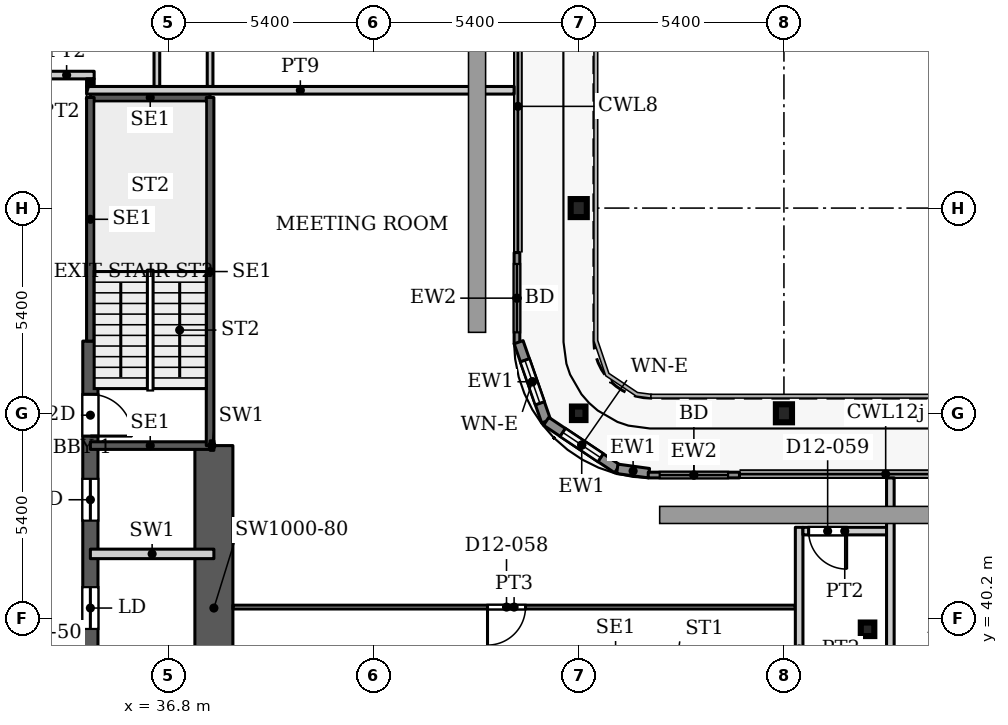
"""IFC4 building model, lengths in metres.
Left out: names, types, materials, properties, quantities, classifications, styles, units other than length and angle.
Written with IfcOpenShell. Run it as: python <this file> out.ifc"""

import sys

from ifc_helpers import new_model, si_unit, direction, frame, frame_2d, origin, origin_2d, place, context, subcontext, project, spatial, rectangle, hollow_rectangle, i_section, extrude, source, transform, mapped, element, fill, save


model = new_model("IFC4")
c1 = context("Model", 3, precision=1e-05, world=origin(), true_north=direction((0.0, 1.0)))
c2 = subcontext(c1, "Body", "Model", "MODEL_VIEW")
j1 = project(units=[si_unit("LENGTHUNIT", "METRE"), si_unit("PLANEANGLEUNIT", "RADIAN")], contexts=[c1])
p1 = place(None, origin())
s1 = spatial("IfcSite", under=j1, at=p1, CompositionType="ELEMENT")
p2 = place(p1, origin())
s2 = spatial("IfcBuilding", under=s1, at=p2, CompositionType="ELEMENT")
p3 = place(p2, frame((0.0, 0.0, 53.9)))
s3 = spatial("IfcBuildingStorey", under=s2, at=p3, CompositionType="ELEMENT", Elevation=53.9)
for number, where, z_axis, x_axis in (
    (1, (53.0, 45.6, 0.0), (0.0, 0.0, 1.0), (1.0, 0.0, 0.0)),
    (2, (47.6, 51.0, 0.0), (0.0, 0.0, 1.0), (1.0, 0.0, 0.0)),
):
    element("IfcColumn", number, at=place(p3, frame(where, z_axis=z_axis, x_axis=x_axis)), inside=s3, PredefinedType="COLUMN", context=c2, shape_type="SweptSolid", body=[
        extrude(i_section(OverallWidth=0.424, OverallDepth=0.474, WebThickness=0.048, FlangeThickness=0.077, FilletRadius=0.014, at=origin_2d()), origin(), (0.0, 0.0, 1.0), 3.9),
    ])
for number, where, z_axis, x_axis in (
    (3, (55.2, 39.916, 0.0), (0.0, 0.0, 1.0), (1.0, 0.0, 0.0)),
    (4, (47.6, 45.6, 0.0), (0.0, 0.0, 1.0), (1.0, 0.0, 0.0)),
):
    element("IfcColumn", number, at=place(p3, frame(where, z_axis=z_axis, x_axis=x_axis)), inside=s3, PredefinedType="COLUMN", context=c2, shape_type="SweptSolid", body=[
        extrude(hollow_rectangle(XDim=0.356, YDim=0.356, WallThickness=0.016, InnerFilletRadius=0.016, OuterFilletRadius=0.032, at=origin_2d()), origin(), (0.0, 0.0, 1.0), 3.9),
    ])
p4 = place(p3, frame((34.75, 29.05, 0.0), z_axis=(0.0, 0.0, 1.0), x_axis=(0.0, 1.0, 0.0)))
e5 = element("IfcWall", 5, at=p4, inside=s3, PredefinedType="SHEAR", context=c2, shape_type="SweptSolid", body=[
    extrude(rectangle(XDim=18.45, YDim=0.4, at=frame_2d((9.225, 0.0))), origin(), (0.0, 0.0, 1.0), 3.9),
])
p5 = place(p4, frame((8.025, 0.0, 0.0)))
e6 = element("IfcOpeningElement", 6, at=p5, cuts=e5, PredefinedType="OPENING", context=c2, shape_type="SweptSolid", body=[
    extrude(rectangle(XDim=1.1, YDim=2.2, at=frame_2d((0.55, 1.1))), frame((0.0, 0.21, 0.0), z_axis=(0.0, -1.0, 0.0), x_axis=(1.0, 0.0, 0.0)), (0.0, 0.0, 1.0), 0.42),
])
p6 = place(p4, frame((10.875, 0.0, 0.0)))
e7 = element("IfcOpeningElement", 7, at=p6, cuts=e5, PredefinedType="OPENING", context=c2, shape_type="SweptSolid", body=[
    extrude(rectangle(XDim=1.1, YDim=2.2, at=frame_2d((0.55, 1.1))), frame((0.0, 0.21, 0.0), z_axis=(0.0, -1.0, 0.0), x_axis=(1.0, 0.0, 0.0)), (0.0, 0.0, 1.0), 0.42),
])
p7 = place(p4, frame((13.725, 0.0, 0.0)))
e8 = element("IfcOpeningElement", 8, at=p7, cuts=e5, PredefinedType="OPENING", context=c2, shape_type="SweptSolid", body=[
    extrude(rectangle(XDim=1.1, YDim=2.2, at=frame_2d((0.55, 1.1))), frame((0.0, 0.21, 0.0), z_axis=(0.0, -1.0, 0.0), x_axis=(1.0, 0.0, 0.0)), (0.0, 0.0, 1.0), 0.42),
])
p8 = place(p4, frame((15.95, 0.0, 0.0)))
e9 = element("IfcOpeningElement", 9, at=p8, cuts=e5, PredefinedType="OPENING", context=c2, shape_type="SweptSolid", body=[
    extrude(rectangle(XDim=1.1, YDim=2.2, at=frame_2d((0.55, 1.1))), frame((0.0, 0.21, 0.0), z_axis=(0.0, -1.0, 0.0), x_axis=(1.0, 0.0, 0.0)), (0.0, 0.0, 1.0), 0.42),
])
p9 = place(p3, frame((38.0, 36.2, 0.0), z_axis=(0.0, 0.0, 1.0), x_axis=(0.0, 1.0, 0.0)))
e10 = element("IfcWall", 10, at=p9, inside=s3, PredefinedType="SHEAR", context=c2, shape_type="SweptSolid", body=[
    extrude(rectangle(XDim=8.55, YDim=1.0, at=frame_2d((4.275, 0.0))), origin(), (0.0, 0.0, 1.0), 3.9),
])
p10 = place(p3, frame((45.975, 49.83, 0.0), z_axis=(0.0, 0.0, 1.0), x_axis=(0.0, -1.0, 0.0)))
e11 = element("IfcWall", 11, at=p10, inside=s3, PredefinedType="SOLIDWALL", context=c2, shape_type="SweptSolid", body=[
    extrude(rectangle(XDim=2.4, YDim=0.15, at=frame_2d((1.2, 0.0))), origin(), (0.0, 0.0, 1.0), 3.75),
])
p11 = place(p10, frame((0.3, 0.0, 0.0)))
e12 = element("IfcOpeningElement", 12, at=p11, cuts=e11, PredefinedType="OPENING", context=c2, shape_type="SweptSolid", body=[
    extrude(rectangle(XDim=1.8, YDim=2.4, at=frame_2d((0.9, 1.2))), frame((0.0, 0.085, 0.0), z_axis=(0.0, -1.0, 0.0), x_axis=(1.0, 0.0, 0.0)), (0.0, 0.0, 1.0), 0.17),
])
p12 = place(p3, frame((46.018, 47.471, 0.0), z_axis=(0.0, 0.0, 1.0), x_axis=(0.328791208903, -0.944402637093, 0.0)))
e13 = element("IfcWall", 13, at=p12, inside=s3, PredefinedType="SOLIDWALL", context=c2, shape_type="SweptSolid", body=[
    extrude(rectangle(XDim=2.205, YDim=0.25, at=frame_2d((1.102, 0.0))), origin(), (0.0, 0.0, 1.0), 3.75),
])
p13 = place(p12, frame((0.503, 0.0, 0.6)))
e14 = element("IfcOpeningElement", 14, at=p13, cuts=e13, PredefinedType="OPENING", context=c2, shape_type="SweptSolid", body=[
    extrude(rectangle(XDim=1.2, YDim=2.1, at=frame_2d((0.6, 1.05))), frame((0.0, 0.135, 0.0), z_axis=(0.0, -1.0, 0.0), x_axis=(1.0, 0.0, 0.0)), (0.0, 0.0, 1.0), 0.27),
])
p14 = place(p3, frame((46.743, 45.389, 0.0), z_axis=(0.0, 0.0, 1.0), x_axis=(0.831449265529, -0.555600682912, 0.0)))
e15 = element("IfcWall", 15, at=p14, inside=s3, PredefinedType="SOLIDWALL", context=c2, shape_type="SweptSolid", body=[
    extrude(rectangle(XDim=2.251, YDim=0.25, at=frame_2d((1.126, 0.0))), origin(), (0.0, 0.0, 1.0), 3.75),
])
p15 = place(p14, frame((0.525, 0.0, 0.6)))
e16 = element("IfcOpeningElement", 16, at=p15, cuts=e15, PredefinedType="OPENING", context=c2, shape_type="SweptSolid", body=[
    extrude(rectangle(XDim=1.2, YDim=2.1, at=frame_2d((0.6, 1.05))), frame((0.0, 0.135, 0.0), z_axis=(0.0, -1.0, 0.0), x_axis=(1.0, 0.0, 0.0)), (0.0, 0.0, 1.0), 0.27),
])
p16 = place(p3, frame((48.615, 44.138, 0.0), z_axis=(0.0, 0.0, 1.0), x_axis=(0.990741504246, -0.135761819977, 0.0)))
e17 = element("IfcWall", 17, at=p16, inside=s3, PredefinedType="SOLIDWALL", context=c2, shape_type="SweptSolid", body=[
    extrude(rectangle(XDim=0.84, YDim=0.25, at=frame_2d((0.42, 0.0))), origin(), (0.0, 0.0, 1.0), 3.75),
])
p17 = place(p3, frame((49.43, 43.975, 0.0), z_axis=(0.0, 0.0, 1.0), x_axis=(1.0, 0.0, 0.0)))
e18 = element("IfcWall", 18, at=p17, inside=s3, PredefinedType="SOLIDWALL", context=c2, shape_type="SweptSolid", body=[
    extrude(rectangle(XDim=2.4, YDim=0.15, at=frame_2d((1.2, 0.0))), origin(), (0.0, 0.0, 1.0), 3.75),
])
p18 = place(p17, frame((0.3, 0.0, 0.0)))
e19 = element("IfcOpeningElement", 19, at=p18, cuts=e18, PredefinedType="OPENING", context=c2, shape_type="SweptSolid", body=[
    extrude(rectangle(XDim=1.8, YDim=2.4, at=frame_2d((0.9, 1.2))), frame((0.0, 0.085, 0.0), z_axis=(0.0, -1.0, 0.0), x_axis=(1.0, 0.0, 0.0)), (0.0, 0.0, 1.0), 0.17),
])
for number, where, z_axis, x_axis in (
    (20, (34.75, 44.75, 0.0), (0.0, 0.0, 1.0), (1.0, 0.0, 0.0)),
    (21, (34.75, 53.91, 0.0), (0.0, 0.0, 1.0), (1.0, 0.0, 0.0)),
):
    element("IfcWall", number, at=place(p3, frame(where, z_axis=z_axis, x_axis=x_axis)), inside=s3, PredefinedType="SHEAR", context=c2, shape_type="SweptSolid", body=[
        extrude(rectangle(XDim=3.15, YDim=0.2, at=frame_2d((1.575, 0.0))), origin(), (0.0, 0.0, 1.0), 3.9),
    ])
p19 = place(p3, frame((34.75, 47.5, 0.0), z_axis=(0.0, 0.0, 1.0), x_axis=(0.0, 1.0, 0.0)))
e22 = element("IfcWall", 22, at=p19, inside=s3, PredefinedType="SHEAR", context=c2, shape_type="SweptSolid", body=[
    extrude(rectangle(XDim=6.41, YDim=0.2, at=frame_2d((3.205, 0.0))), origin(), (0.0, 0.0, 1.0), 3.9),
])
p20 = place(p3, frame((37.9, 44.75, 0.0), z_axis=(0.0, 0.0, 1.0), x_axis=(0.0, 1.0, 0.0)))
e23 = element("IfcWall", 23, at=p20, inside=s3, PredefinedType="SHEAR", context=c2, shape_type="SweptSolid", body=[
    extrude(rectangle(XDim=9.16, YDim=0.2, at=frame_2d((4.58, 0.0))), origin(), (0.0, 0.0, 1.0), 3.9),
])
p21 = place(p3, frame((34.75, 41.9, 0.0), z_axis=(0.0, 0.0, 1.0), x_axis=(1.0, 0.0, 0.0)))
e24 = element("IfcWall", 24, at=p21, inside=s3, PredefinedType="PARTITIONING", context=c2, shape_type="SweptSolid", body=[
    extrude(rectangle(XDim=3.25, YDim=0.25, at=frame_2d((1.625, 0.0))), origin(), (0.0, 0.0, 1.0), 3.9),
])
p22 = place(p3, frame((37.9, 44.75, 0.0), z_axis=(0.0, 0.0, 1.0), x_axis=(1.0, 0.0, 0.0)))
e25 = element("IfcWall", 25, at=p22, inside=s3, PredefinedType="PARTITIONING", context=c2, shape_type="SweptSolid", body=[
    extrude(rectangle(XDim=0.1, YDim=0.25, at=frame_2d((0.05, 0.0))), origin(), (0.0, 0.0, 1.0), 3.9),
])
p23 = place(p3, frame((33.4, 54.5, 0.0), z_axis=(0.0, 0.0, 1.0), x_axis=(1.0, 0.0, 0.0)))
e26 = element("IfcWall", 26, at=p23, inside=s3, PredefinedType="PARTITIONING", context=c2, shape_type="SweptSolid", body=[
    extrude(rectangle(XDim=1.45, YDim=0.2, at=frame_2d((0.725, 0.0))), origin(), (0.0, 0.0, 1.0), 3.6),
])
p24 = place(p3, frame((34.65, 54.1, 0.0), z_axis=(0.0, 0.0, 1.0), x_axis=(1.0, 0.0, 0.0)))
e27 = element("IfcWall", 27, at=p24, inside=s3, PredefinedType="PARTITIONING", context=c2, shape_type="SweptSolid", body=[
    extrude(rectangle(XDim=11.25, YDim=0.2, at=frame_2d((5.625, 0.0))), origin(), (0.0, 0.0, 1.0), 3.6),
])
p25 = place(p3, frame((34.75, 54.2, 0.0), z_axis=(0.0, 0.0, 1.0), x_axis=(0.0, 1.0, 0.0)))
e28 = element("IfcWall", 28, at=p25, inside=s3, PredefinedType="PARTITIONING", context=c2, shape_type="SweptSolid", body=[
    extrude(rectangle(XDim=0.2, YDim=0.2, at=frame_2d((0.1, 0.0))), origin(), (0.0, 0.0, 1.0), 3.6),
])
p26 = place(p3, frame((36.5, 54.2, 0.0), z_axis=(0.0, 0.0, 1.0), x_axis=(0.0, 1.0, 0.0)))
e29 = element("IfcWall", 29, at=p26, inside=s3, PredefinedType="PARTITIONING", context=c2, shape_type="SweptSolid", body=[
    extrude(rectangle(XDim=10.175, YDim=0.15, at=frame_2d((5.087, 0.0))), origin(), (0.0, 0.0, 1.0), 3.6),
])
p27 = place(p26, frame((5.8, 0.0, 0.0)))
e30 = element("IfcOpeningElement", 30, at=p27, cuts=e29, PredefinedType="OPENING", context=c2, shape_type="SweptSolid", body=[
    extrude(rectangle(XDim=0.8, YDim=2.1, at=frame_2d((0.4, 1.05))), frame((0.0, 0.085, 0.0), z_axis=(0.0, -1.0, 0.0), x_axis=(1.0, 0.0, 0.0)), (0.0, 0.0, 1.0), 0.17),
])
p28 = place(p26, frame((1.45, 0.0, 0.0)))
e31 = element("IfcOpeningElement", 31, at=p28, cuts=e29, PredefinedType="OPENING", context=c2, shape_type="SweptSolid", body=[
    extrude(rectangle(XDim=0.9, YDim=2.1, at=frame_2d((0.45, 1.05))), frame((0.0, 0.085, 0.0), z_axis=(0.0, -1.0, 0.0), x_axis=(1.0, 0.0, 0.0)), (0.0, 0.0, 1.0), 0.17),
])
p29 = place(p26, frame((8.5, 0.0, 0.0)))
e32 = element("IfcOpeningElement", 32, at=p29, cuts=e29, PredefinedType="OPENING", context=c2, shape_type="SweptSolid", body=[
    extrude(rectangle(XDim=0.8, YDim=2.1, at=frame_2d((0.4, 1.05))), frame((0.0, 0.085, 0.0), z_axis=(0.0, -1.0, 0.0), x_axis=(1.0, 0.0, 0.0)), (0.0, 0.0, 1.0), 0.17),
])
p30 = place(p3, frame((37.9, 54.2, 0.0), z_axis=(0.0, 0.0, 1.0), x_axis=(0.0, 1.0, 0.0)))
e33 = element("IfcWall", 33, at=p30, inside=s3, PredefinedType="PARTITIONING", context=c2, shape_type="SweptSolid", body=[
    extrude(rectangle(XDim=13.3, YDim=0.15, at=frame_2d((6.65, 0.0))), origin(), (0.0, 0.0, 1.0), 3.6),
])
p31 = place(p30, frame((1.25, 0.0, 0.0)))
e34 = element("IfcOpeningElement", 34, at=p31, cuts=e33, PredefinedType="OPENING", context=c2, shape_type="SweptSolid", body=[
    extrude(rectangle(XDim=0.9, YDim=2.1, at=frame_2d((0.45, 1.05))), frame((0.0, 0.085, 0.0), z_axis=(0.0, -1.0, 0.0), x_axis=(1.0, 0.0, 0.0)), (0.0, 0.0, 1.0), 0.17),
])
p32 = place(p30, frame((10.2, 0.0, 0.0)))
e35 = element("IfcOpeningElement", 35, at=p32, cuts=e33, PredefinedType="OPENING", context=c2, shape_type="SweptSolid", body=[
    extrude(rectangle(XDim=1.0, YDim=2.1, at=frame_2d((0.5, 1.05))), frame((0.0, 0.085, 0.0), z_axis=(0.0, -1.0, 0.0), x_axis=(1.0, 0.0, 0.0)), (0.0, 0.0, 1.0), 0.17),
])
p33 = place(p30, frame((4.25, 0.0, 0.0)))
e36 = element("IfcOpeningElement", 36, at=p33, cuts=e33, PredefinedType="OPENING", context=c2, shape_type="SweptSolid", body=[
    extrude(rectangle(XDim=0.9, YDim=2.1, at=frame_2d((0.45, 1.05))), frame((0.0, 0.085, 0.0), z_axis=(0.0, -1.0, 0.0), x_axis=(1.0, 0.0, 0.0)), (0.0, 0.0, 1.0), 0.17),
])
p34 = place(p3, frame((38.499, 40.5, 0.0), z_axis=(0.0, 0.0, 1.0), x_axis=(1.0, 0.0, 0.0)))
e37 = element("IfcWall", 37, at=p34, inside=s3, PredefinedType="PARTITIONING", context=c2, shape_type="SweptSolid", body=[
    extrude(rectangle(XDim=14.801, YDim=0.1, at=frame_2d((7.4, 0.0))), origin(), (0.0, 0.0, 1.0), 3.6),
])
p35 = place(p34, frame((6.701, 0.0, 0.0)))
e38 = element("IfcOpeningElement", 38, at=p35, cuts=e37, PredefinedType="OPENING", context=c2, shape_type="SweptSolid", body=[
    extrude(rectangle(XDim=1.0, YDim=2.1, at=frame_2d((0.5, 1.05))), frame((0.0, 0.06, 0.0), z_axis=(0.0, -1.0, 0.0), x_axis=(1.0, 0.0, 0.0)), (0.0, 0.0, 1.0), 0.12),
])
p36 = place(p3, frame((53.4, 36.199, 0.0), z_axis=(0.0, 0.0, 1.0), x_axis=(0.0, 1.0, 0.0)))
e39 = element("IfcWall", 39, at=p36, inside=s3, PredefinedType="PARTITIONING", context=c2, shape_type="SweptSolid", body=[
    extrude(rectangle(XDim=6.401, YDim=0.2, at=frame_2d((3.201, 0.0))), origin(), (0.0, 0.0, 1.0), 3.6),
])
p37 = place(p3, frame((53.5, 42.5, 0.0), z_axis=(0.0, 0.0, 1.0), x_axis=(1.0, 0.0, 0.0)))
e40 = element("IfcWall", 40, at=p37, inside=s3, PredefinedType="PARTITIONING", context=c2, shape_type="SweptSolid", body=[
    extrude(rectangle(XDim=2.2, YDim=0.2, at=frame_2d((1.1, 0.0))), origin(), (0.0, 0.0, 1.0), 3.6),
])
p38 = place(p37, frame((0.15, 0.0, 0.0)))
e41 = element("IfcOpeningElement", 41, at=p38, cuts=e40, PredefinedType="OPENING", context=c2, shape_type="SweptSolid", body=[
    extrude(rectangle(XDim=1.0, YDim=2.1, at=frame_2d((0.5, 1.05))), frame((0.0, 0.11, 0.0), z_axis=(0.0, -1.0, 0.0), x_axis=(1.0, 0.0, 0.0)), (0.0, 0.0, 1.0), 0.22),
])
p39 = place(p3, frame((55.8, 30.4, 0.0), z_axis=(0.0, 0.0, 1.0), x_axis=(0.0, 1.0, 0.0)))
e42 = element("IfcWall", 42, at=p39, inside=s3, PredefinedType="PARTITIONING", context=c2, shape_type="SweptSolid", body=[
    extrude(rectangle(XDim=13.5, YDim=0.2, at=frame_2d((6.75, 0.0))), origin(), (0.0, 0.0, 1.0), 3.6),
])
m1 = source(origin(), c2, "Body", "SweptSolid", [
    extrude(rectangle(XDim=1.8, YDim=2.4, at=frame_2d((0.9, 1.2))), frame((0.0, 0.025, 0.0), z_axis=(0.0, -1.0, 0.0), x_axis=(1.0, 0.0, 0.0)), (0.0, 0.0, 1.0), 0.05),
])
p40 = place(p11, origin())
e43 = element("IfcDoor", 43, at=p40, inside=s3, OperationType="SLIDING_TO_LEFT", PredefinedType="DOOR", context=c2, shape_type="MappedRepresentation", body=[
    mapped(m1, transform((0.0, 0.0, 0.0), x_axis=(1.0, 0.0, 0.0), y_axis=(0.0, 1.0, 0.0), z_axis=(0.0, 0.0, 1.0), scale=1.0)),
])
fill(e12, e43)
m2 = source(origin(), c2, "Body", "SweptSolid", [
    extrude(rectangle(XDim=1.2, YDim=2.1, at=frame_2d((0.6, 1.05))), frame((0.0, 0.03, 0.0), z_axis=(0.0, -1.0, 0.0), x_axis=(1.0, 0.0, 0.0)), (0.0, 0.0, 1.0), 0.06),
])
p41 = place(p13, origin())
e44 = element("IfcWindow", 44, at=p41, inside=s3, PartitioningType="SINGLE_PANEL", PredefinedType="WINDOW", context=c2, shape_type="MappedRepresentation", body=[
    mapped(m2, transform((0.0, 0.0, 0.0), x_axis=(1.0, 0.0, 0.0), y_axis=(0.0, 1.0, 0.0), z_axis=(0.0, 0.0, 1.0), scale=1.0)),
])
fill(e14, e44)
p42 = place(p15, origin())
e45 = element("IfcWindow", 45, at=p42, inside=s3, PartitioningType="SINGLE_PANEL", PredefinedType="WINDOW", context=c2, shape_type="MappedRepresentation", body=[
    mapped(m2, transform((0.0, 0.0, 0.0), x_axis=(1.0, 0.0, 0.0), y_axis=(0.0, 1.0, 0.0), z_axis=(0.0, 0.0, 1.0), scale=1.0)),
])
fill(e16, e45)
p43 = place(p18, origin())
e46 = element("IfcDoor", 46, at=p43, inside=s3, OperationType="SLIDING_TO_LEFT", PredefinedType="DOOR", context=c2, shape_type="MappedRepresentation", body=[
    mapped(m1, transform((0.0, 0.0, 0.0), x_axis=(1.0, 0.0, 0.0), y_axis=(0.0, 1.0, 0.0), z_axis=(0.0, 0.0, 1.0), scale=1.0)),
])
fill(e19, e46)
m3 = source(origin(), c2, "Body", "SweptSolid", [
    extrude(rectangle(XDim=1.1, YDim=2.2, at=frame_2d((0.55, 1.1))), frame((0.0, 0.025, 0.0), z_axis=(0.0, -1.0, 0.0), x_axis=(1.0, 0.0, 0.0)), (0.0, 0.0, 1.0), 0.05),
])
p44 = place(p6, origin())
e47 = element("IfcDoor", 47, at=p44, inside=s3, OperationType="SLIDING_TO_LEFT", PredefinedType="DOOR", context=c2, shape_type="MappedRepresentation", body=[
    mapped(m3, transform((0.0, 0.0, 0.0), x_axis=(1.0, 0.0, 0.0), y_axis=(0.0, 1.0, 0.0), z_axis=(0.0, 0.0, 1.0), scale=1.0)),
])
fill(e7, e47)
p45 = place(p7, origin())
e48 = element("IfcDoor", 48, at=p45, inside=s3, OperationType="SLIDING_TO_LEFT", PredefinedType="DOOR", context=c2, shape_type="MappedRepresentation", body=[
    mapped(m3, transform((0.0, 0.0, 0.0), x_axis=(1.0, 0.0, 0.0), y_axis=(0.0, 1.0, 0.0), z_axis=(0.0, 0.0, 1.0), scale=1.0)),
])
fill(e8, e48)
m4 = source(origin(), c2, "Body", "SweptSolid", [
    extrude(rectangle(XDim=1.1, YDim=2.2, at=frame_2d((0.55, 1.1))), frame((0.0, 0.025, 0.0), z_axis=(0.0, -1.0, 0.0), x_axis=(1.0, 0.0, 0.0)), (0.0, 0.0, 1.0), 0.05),
])
p46 = place(p8, origin())
e49 = element("IfcDoor", 49, at=p46, inside=s3, OperationType="SINGLE_SWING_RIGHT", PredefinedType="DOOR", context=c2, shape_type="MappedRepresentation", body=[
    mapped(m4, transform((0.0, 0.0, 0.0), x_axis=(1.0, 0.0, 0.0), y_axis=(0.0, 1.0, 0.0), z_axis=(0.0, 0.0, 1.0), scale=1.0)),
])
fill(e9, e49)
m5 = source(origin(), c2, "Body", "SweptSolid", [
    extrude(rectangle(XDim=1.0, YDim=2.1, at=frame_2d((0.5, 1.05))), frame((0.0, 0.025, 0.0), z_axis=(0.0, -1.0, 0.0), x_axis=(1.0, 0.0, 0.0)), (0.0, 0.0, 1.0), 0.05),
])
p47 = place(p35, origin())
e50 = element("IfcDoor", 50, at=p47, inside=s3, OperationType="SINGLE_SWING_RIGHT", PredefinedType="DOOR", context=c2, shape_type="MappedRepresentation", body=[
    mapped(m5, transform((0.0, 0.0, 0.0), x_axis=(1.0, 0.0, 0.0), y_axis=(0.0, 1.0, 0.0), z_axis=(0.0, 0.0, 1.0), scale=1.0)),
])
fill(e38, e50)
m6 = source(origin(), c2, "Body", "SweptSolid", [
    extrude(rectangle(XDim=1.0, YDim=2.1, at=frame_2d((0.5, 1.05))), frame((0.0, 0.025, 0.0), z_axis=(0.0, -1.0, 0.0), x_axis=(1.0, 0.0, 0.0)), (0.0, 0.0, 1.0), 0.05),
])
p48 = place(p38, origin())
e51 = element("IfcDoor", 51, at=p48, inside=s3, OperationType="SINGLE_SWING_RIGHT", PredefinedType="DOOR", context=c2, shape_type="MappedRepresentation", body=[
    mapped(m6, transform((0.0, 0.0, 0.0), x_axis=(1.0, 0.0, 0.0), y_axis=(0.0, 1.0, 0.0), z_axis=(0.0, 0.0, 1.0), scale=1.0)),
])
fill(e41, e51)
save(model, sys.argv[1])
